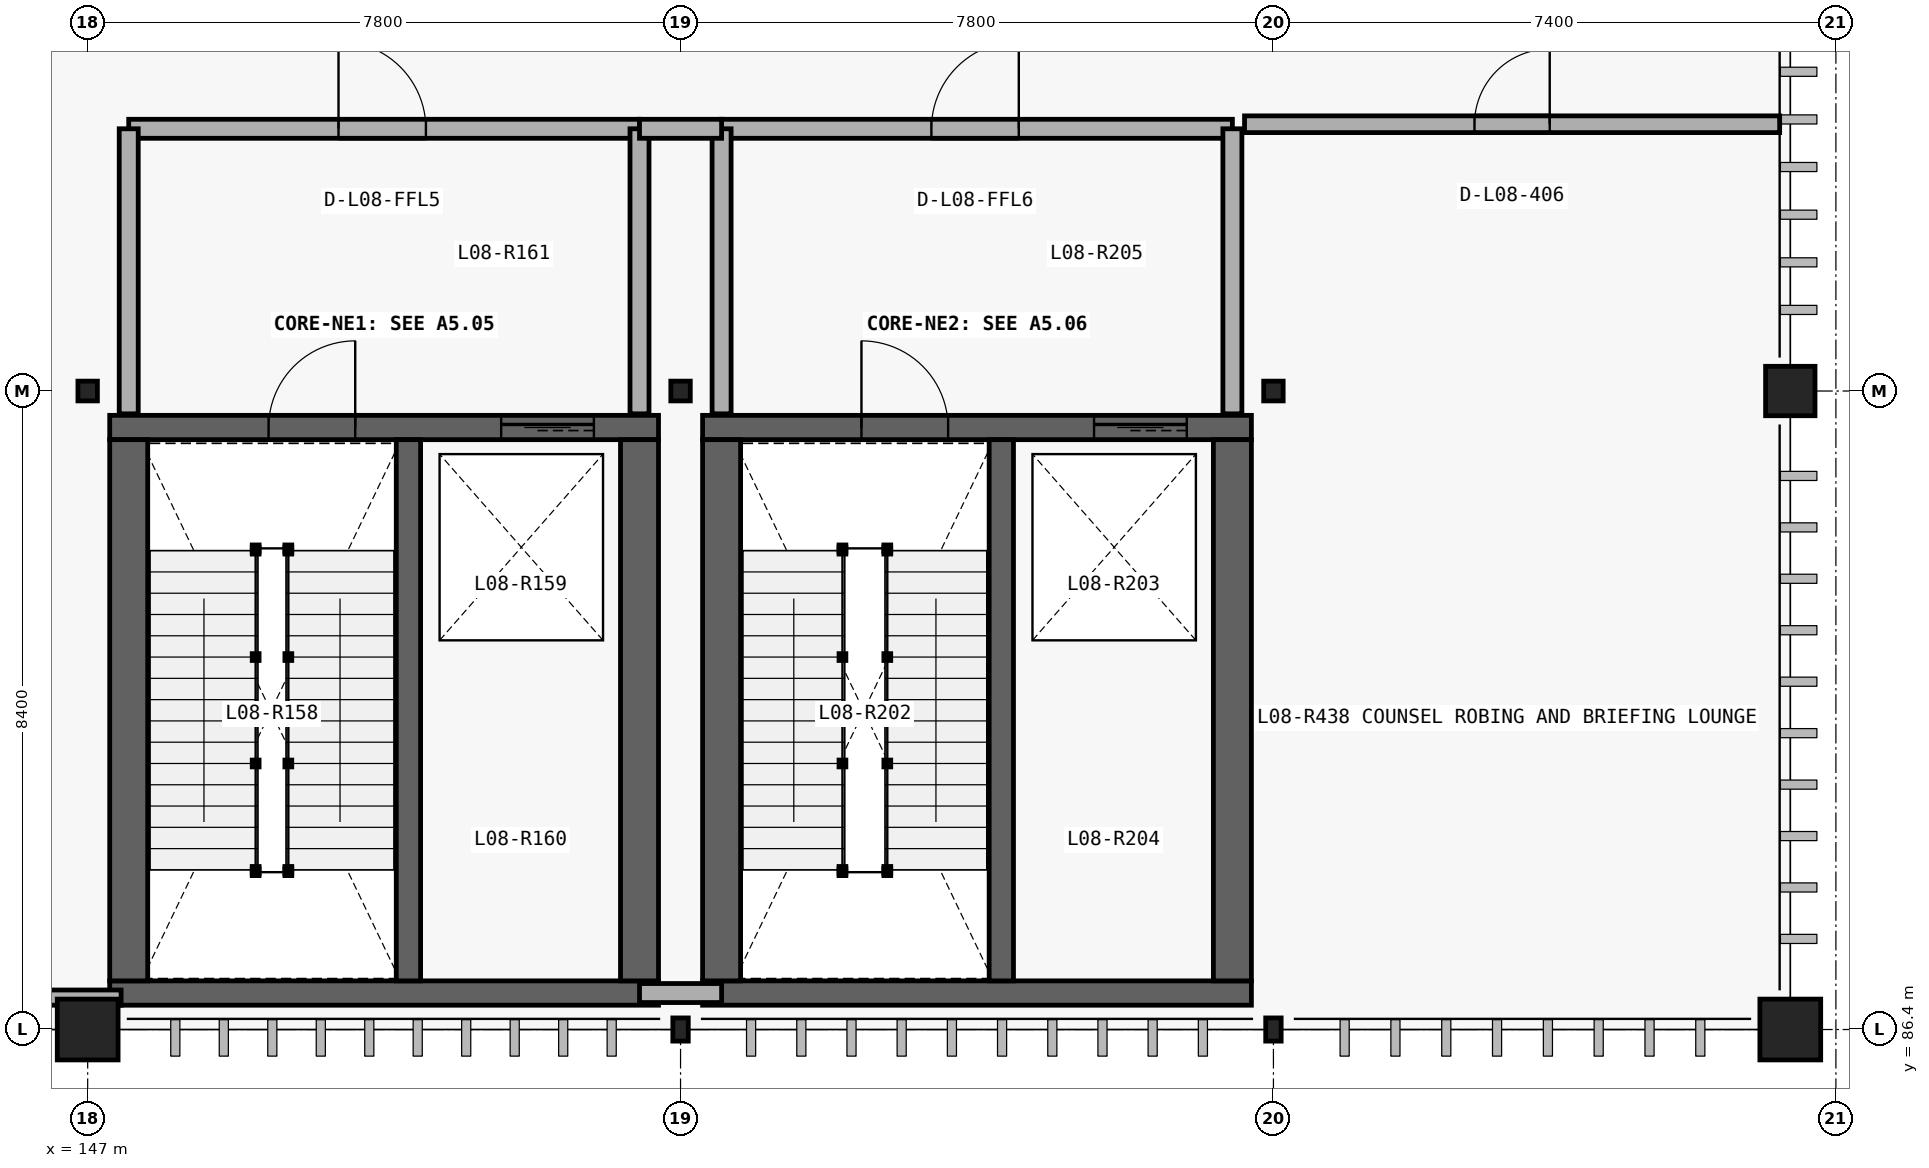
"""IFC4 building model, lengths in metres.
Left out: names, types, materials, properties, quantities, classifications, styles, units other than length and angle.
Written with IfcOpenShell. Run it as: python <this file> out.ifc"""

import sys

from ifc_helpers import new_model, si_unit, direction, frame, frame_2d, origin_with_axes, origin_2d_with_axis, place, context, subcontext, project, spatial, rectangle, hollow_rectangle, circle, i_section, extrude, element, fill, save


model = new_model("IFC4")
c1 = context("Model", 3, precision=1e-05, world=origin_with_axes(), true_north=direction((0.0, 1.0)))
c2 = subcontext(c1, "Body", "Model", "MODEL_VIEW")
j1 = project(units=[si_unit("LENGTHUNIT", "METRE"), si_unit("PLANEANGLEUNIT", "RADIAN")], contexts=[c1])
p1 = place(None, origin_with_axes())
s1 = spatial("IfcSite", under=j1, at=p1, CompositionType="ELEMENT")
p2 = place(p1, origin_with_axes())
s2 = spatial("IfcBuilding", under=s1, at=p2, CompositionType="ELEMENT")
p3 = place(p2, frame((0.0, 0.0, 39.0), z_axis=(0.0, 0.0, 1.0), x_axis=(1.0, 0.0, 0.0)))
s3 = spatial("IfcBuildingStorey", under=s2, at=p3, CompositionType="ELEMENT", Elevation=39.0)
p4 = place(None, frame((147.29, 86.88, 39.0), z_axis=(0.0, 0.0, 1.0), x_axis=(1.0, 0.0, 0.0)))
e1 = element("IfcWall", 1, at=p4, inside=s3, PredefinedType="SHEAR", context=c2, shape_type="SweptSolid", body=[
    extrude(rectangle(XDim=7.22, YDim=0.32, at=frame_2d((3.61, 0.0), x_axis=(1.0, 0.0))), origin_with_axes(), (0.0, 0.0, 1.0), 4.5),
])
p5 = place(None, frame((154.51, 94.32, 39.0), z_axis=(0.0, 0.0, 1.0), x_axis=(-1.0, 0.0, 0.0)))
e2 = element("IfcWall", 2, at=p5, inside=s3, PredefinedType="SHEAR", context=c2, shape_type="SweptSolid", body=[
    extrude(rectangle(XDim=7.22, YDim=0.32, at=frame_2d((3.61, 0.0), x_axis=(1.0, 0.0))), origin_with_axes(), (0.0, 0.0, 1.0), 4.5),
])
p6 = place(None, frame((149.95, 94.32, 39.0), z_axis=(0.0, 0.0, 1.0), x_axis=(-1.0, 0.0, 0.0)))
e3 = element("IfcOpeningElement", 3, at=p6, cuts=e2, PredefinedType="OPENING", context=c2, shape_type="SweptSolid", body=[
    extrude(rectangle(XDim=1.14, YDim=2.18, at=frame_2d((0.0, 1.09), x_axis=(1.0, 0.0))), frame((0.0, 0.17, 0.0), z_axis=(0.0, -1.0, 0.0), x_axis=(1.0, 0.0, 0.0)), (0.0, 0.0, 1.0), 0.34),
])
p7 = place(None, frame((153.05, 94.32, 39.0), z_axis=(0.0, 0.0, 1.0), x_axis=(-1.0, 0.0, 0.0)))
e4 = element("IfcOpeningElement", 4, at=p7, cuts=e2, PredefinedType="OPENING", context=c2, shape_type="SweptSolid", body=[
    extrude(rectangle(XDim=1.22, YDim=2.28, at=frame_2d((0.0, 1.14), x_axis=(1.0, 0.0))), frame((0.0, 0.17, 0.0), z_axis=(0.0, -1.0, 0.0), x_axis=(1.0, 0.0, 0.0)), (0.0, 0.0, 1.0), 0.34),
])
for number, where, z_axis, x_axis in (
    (5, (154.26, 87.04, 39.0), (0.0, 0.0, 1.0), (0.0, 1.0, 0.0)),
    (6, (147.54, 94.16, 39.0), (0.0, 0.0, 1.0), (0.0, -1.0, 0.0)),
):
    element("IfcWall", number, at=place(None, frame(where, z_axis=z_axis, x_axis=x_axis)), inside=s3, PredefinedType="SHEAR", context=c2, shape_type="SweptSolid", body=[
        extrude(rectangle(XDim=7.12, YDim=0.5, at=frame_2d((3.56, 0.0), x_axis=(1.0, 0.0))), origin_with_axes(), (0.0, 0.0, 1.0), 4.5),
    ])
p8 = place(None, frame((151.22, 87.04, 39.0), z_axis=(0.0, 0.0, 1.0), x_axis=(0.0, 1.0, 0.0)))
e7 = element("IfcWall", 7, at=p8, inside=s3, PredefinedType="SHEAR", context=c2, shape_type="SweptSolid", body=[
    extrude(rectangle(XDim=7.12, YDim=0.32, at=frame_2d((3.56, 0.0), x_axis=(1.0, 0.0))), origin_with_axes(), (0.0, 0.0, 1.0), 4.5),
])
p9 = place(None, frame((154.26, 98.25, 39.0), z_axis=(0.0, 0.0, 1.0), x_axis=(-1.0, 0.0, 0.0)))
e8 = element("IfcWall", 8, at=p9, inside=s3, PredefinedType="PARTITIONING", context=c2, shape_type="SweptSolid", body=[
    extrude(rectangle(XDim=6.72, YDim=0.25, at=frame_2d((3.36, 0.0), x_axis=(1.0, 0.0))), origin_with_axes(), (0.0, 0.0, 1.0), 4.18),
])
p10 = place(None, frame((150.875, 98.25, 39.0), z_axis=(0.0, 0.0, 1.0), x_axis=(-1.0, 0.0, 0.0)))
e9 = element("IfcOpeningElement", 9, at=p10, cuts=e8, PredefinedType="OPENING", context=c2, shape_type="SweptSolid", body=[
    extrude(rectangle(XDim=1.15, YDim=2.25, at=frame_2d((0.0, 1.125), x_axis=(1.0, 0.0))), frame((0.0, 0.135, 0.0), z_axis=(0.0, -1.0, 0.0), x_axis=(1.0, 0.0, 0.0)), (0.0, 0.0, 1.0), 0.27),
])
for number, where, z_axis, x_axis in (
    (10, (147.54, 94.5, 39.0), (0.0, 0.0, 1.0), (0.0, 1.0, 0.0)),
    (11, (154.26, 94.5, 39.0), (0.0, 0.0, 1.0), (0.0, 1.0, 0.0)),
):
    element("IfcWall", number, at=place(None, frame(where, z_axis=z_axis, x_axis=x_axis)), inside=s3, PredefinedType="PARTITIONING", context=c2, shape_type="SweptSolid", body=[
        extrude(rectangle(XDim=3.75, YDim=0.25, at=frame_2d((1.875, 0.0), x_axis=(1.0, 0.0))), origin_with_axes(), (0.0, 0.0, 1.0), 4.18),
    ])
p11 = place(None, frame((155.09, 86.88, 39.0), z_axis=(0.0, 0.0, 1.0), x_axis=(1.0, 0.0, 0.0)))
e12 = element("IfcWall", 12, at=p11, inside=s3, PredefinedType="SHEAR", context=c2, shape_type="SweptSolid", body=[
    extrude(rectangle(XDim=7.22, YDim=0.32, at=frame_2d((3.61, 0.0), x_axis=(1.0, 0.0))), origin_with_axes(), (0.0, 0.0, 1.0), 4.5),
])
p12 = place(None, frame((162.31, 94.32, 39.0), z_axis=(0.0, 0.0, 1.0), x_axis=(-1.0, 0.0, 0.0)))
e13 = element("IfcWall", 13, at=p12, inside=s3, PredefinedType="SHEAR", context=c2, shape_type="SweptSolid", body=[
    extrude(rectangle(XDim=7.22, YDim=0.32, at=frame_2d((3.61, 0.0), x_axis=(1.0, 0.0))), origin_with_axes(), (0.0, 0.0, 1.0), 4.5),
])
p13 = place(None, frame((157.75, 94.32, 39.0), z_axis=(0.0, 0.0, 1.0), x_axis=(-1.0, 0.0, 0.0)))
e14 = element("IfcOpeningElement", 14, at=p13, cuts=e13, PredefinedType="OPENING", context=c2, shape_type="SweptSolid", body=[
    extrude(rectangle(XDim=1.14, YDim=2.18, at=frame_2d((0.0, 1.09), x_axis=(1.0, 0.0))), frame((0.0, 0.17, 0.0), z_axis=(0.0, -1.0, 0.0), x_axis=(1.0, 0.0, 0.0)), (0.0, 0.0, 1.0), 0.34),
])
p14 = place(None, frame((160.85, 94.32, 39.0), z_axis=(0.0, 0.0, 1.0), x_axis=(-1.0, 0.0, 0.0)))
e15 = element("IfcOpeningElement", 15, at=p14, cuts=e13, PredefinedType="OPENING", context=c2, shape_type="SweptSolid", body=[
    extrude(rectangle(XDim=1.22, YDim=2.28, at=frame_2d((0.0, 1.14), x_axis=(1.0, 0.0))), frame((0.0, 0.17, 0.0), z_axis=(0.0, -1.0, 0.0), x_axis=(1.0, 0.0, 0.0)), (0.0, 0.0, 1.0), 0.34),
])
for number, where, z_axis, x_axis in (
    (16, (162.06, 87.04, 39.0), (0.0, 0.0, 1.0), (0.0, 1.0, 0.0)),
    (17, (155.34, 94.16, 39.0), (0.0, 0.0, 1.0), (0.0, -1.0, 0.0)),
):
    element("IfcWall", number, at=place(None, frame(where, z_axis=z_axis, x_axis=x_axis)), inside=s3, PredefinedType="SHEAR", context=c2, shape_type="SweptSolid", body=[
        extrude(rectangle(XDim=7.12, YDim=0.5, at=frame_2d((3.56, 0.0), x_axis=(1.0, 0.0))), origin_with_axes(), (0.0, 0.0, 1.0), 4.5),
    ])
p15 = place(None, frame((159.02, 87.04, 39.0), z_axis=(0.0, 0.0, 1.0), x_axis=(0.0, 1.0, 0.0)))
e18 = element("IfcWall", 18, at=p15, inside=s3, PredefinedType="SHEAR", context=c2, shape_type="SweptSolid", body=[
    extrude(rectangle(XDim=7.12, YDim=0.32, at=frame_2d((3.56, 0.0), x_axis=(1.0, 0.0))), origin_with_axes(), (0.0, 0.0, 1.0), 4.5),
])
p16 = place(None, frame((162.06, 98.25, 39.0), z_axis=(0.0, 0.0, 1.0), x_axis=(-1.0, 0.0, 0.0)))
e19 = element("IfcWall", 19, at=p16, inside=s3, PredefinedType="PARTITIONING", context=c2, shape_type="SweptSolid", body=[
    extrude(rectangle(XDim=6.72, YDim=0.25, at=frame_2d((3.36, 0.0), x_axis=(1.0, 0.0))), origin_with_axes(), (0.0, 0.0, 1.0), 4.18),
])
p17 = place(None, frame((158.675, 98.25, 39.0), z_axis=(0.0, 0.0, 1.0), x_axis=(-1.0, 0.0, 0.0)))
e20 = element("IfcOpeningElement", 20, at=p17, cuts=e19, PredefinedType="OPENING", context=c2, shape_type="SweptSolid", body=[
    extrude(rectangle(XDim=1.15, YDim=2.25, at=frame_2d((0.0, 1.125), x_axis=(1.0, 0.0))), frame((0.0, 0.135, 0.0), z_axis=(0.0, -1.0, 0.0), x_axis=(1.0, 0.0, 0.0)), (0.0, 0.0, 1.0), 0.27),
])
for number, where, z_axis, x_axis in (
    (21, (155.34, 94.5, 39.0), (0.0, 0.0, 1.0), (0.0, 1.0, 0.0)),
    (22, (162.06, 94.5, 39.0), (0.0, 0.0, 1.0), (0.0, 1.0, 0.0)),
):
    element("IfcWall", number, at=place(None, frame(where, z_axis=z_axis, x_axis=x_axis)), inside=s3, PredefinedType="PARTITIONING", context=c2, shape_type="SweptSolid", body=[
        extrude(rectangle(XDim=3.75, YDim=0.25, at=frame_2d((1.875, 0.0), x_axis=(1.0, 0.0))), origin_with_axes(), (0.0, 0.0, 1.0), 4.18),
    ])
for number, where, z_axis, x_axis in (
    (23, (154.26, 98.25, 39.0), (0.0, 0.0, 1.0), (1.0, 0.0, 0.0)),
    (24, (154.26, 86.88, 39.0), (0.0, 0.0, 1.0), (1.0, 0.0, 0.0)),
):
    element("IfcWall", number, at=place(None, frame(where, z_axis=z_axis, x_axis=x_axis)), inside=s3, PredefinedType="PARTITIONING", context=c2, shape_type="SweptSolid", body=[
        extrude(rectangle(XDim=1.08, YDim=0.25, at=frame_2d((0.54, 0.0), x_axis=(1.0, 0.0))), origin_with_axes(), (0.0, 0.0, 1.0), 4.18),
    ])
p18 = place(None, frame((144.8, 86.82, 39.0), z_axis=(0.0, 0.0, 1.0), x_axis=(1.0, 0.0, 0.0)))
e25 = element("IfcWall", 25, at=p18, inside=s3, PredefinedType="PARTITIONING", context=c2, shape_type="SweptSolid", body=[
    extrude(rectangle(XDim=2.64, YDim=0.2, at=frame_2d((1.32, 0.0), x_axis=(1.0, 0.0))), origin_with_axes(), (0.0, 0.0, 1.0), 4.18),
])
p19 = place(None, frame((162.22, 98.31, 39.0), z_axis=(0.0, 0.0, 1.0), x_axis=(1.0, 0.0, 0.0)))
e26 = element("IfcWall", 26, at=p19, inside=s3, PredefinedType="PARTITIONING", context=c2, shape_type="SweptSolid", body=[
    extrude(rectangle(XDim=7.04, YDim=0.22, at=frame_2d((3.52, 0.0), x_axis=(1.0, 0.0))), origin_with_axes(), (0.0, 0.0, 1.0), 4.18),
])
p20 = place(None, frame((165.74, 98.31, 39.0), z_axis=(0.0, 0.0, 1.0), x_axis=(1.0, 0.0, 0.0)))
e27 = element("IfcOpeningElement", 27, at=p20, cuts=e26, PredefinedType="OPENING", context=c2, shape_type="SweptSolid", body=[
    extrude(rectangle(XDim=0.99, YDim=2.22, at=frame_2d((0.0, 1.11), x_axis=(1.0, 0.0))), frame((0.0, 0.12, 0.0), z_axis=(0.0, -1.0, 0.0), x_axis=(1.0, 0.0, 0.0)), (0.0, 0.0, 1.0), 0.24),
])
p21 = place(None, frame((147.0, 86.4, 39.0), z_axis=(0.0, 0.0, 1.0), x_axis=(1.0, 0.0, 0.0)))
e28 = element("IfcColumn", 28, at=p21, inside=s3, PredefinedType="COLUMN", context=c2, shape_type="SweptSolid", body=[
    extrude(circle(Radius=0.4, at=origin_2d_with_axis()), origin_with_axes(), (0.0, 0.0, 1.0), 4.5),
])
p22 = place(None, frame((147.0, 94.8, 39.0), z_axis=(0.0, 0.0, 1.0), x_axis=(1.0, 0.0, 0.0)))
e29 = element("IfcColumn", 29, at=p22, inside=s3, PredefinedType="COLUMN", context=c2, shape_type="SweptSolid", body=[
    extrude(i_section(OverallWidth=0.256, OverallDepth=0.26, WebThickness=0.011, FlangeThickness=0.017, at=origin_2d_with_axis()), origin_with_axes(), (0.0, 0.0, 1.0), 4.5),
])
p23 = place(None, frame((154.8, 86.4, 39.0), z_axis=(0.0, 0.0, 1.0), x_axis=(1.0, 0.0, 0.0)))
e30 = element("IfcColumn", 30, at=p23, inside=s3, PredefinedType="COLUMN", context=c2, shape_type="SweptSolid", body=[
    extrude(hollow_rectangle(XDim=0.203, YDim=0.305, WallThickness=0.013, InnerFilletRadius=0.025, OuterFilletRadius=0.013, at=origin_2d_with_axis()), origin_with_axes(), (0.0, 0.0, 1.0), 4.5),
])
p24 = place(None, frame((154.8, 94.8, 39.0), z_axis=(0.0, 0.0, 1.0), x_axis=(1.0, 0.0, 0.0)))
e31 = element("IfcColumn", 31, at=p24, inside=s3, PredefinedType="COLUMN", context=c2, shape_type="SweptSolid", body=[
    extrude(i_section(OverallWidth=0.256, OverallDepth=0.26, WebThickness=0.011, FlangeThickness=0.017, at=origin_2d_with_axis()), origin_with_axes(), (0.0, 0.0, 1.0), 4.5),
])
p25 = place(None, frame((162.6, 86.4, 39.0), z_axis=(0.0, 0.0, 1.0), x_axis=(1.0, 0.0, 0.0)))
e32 = element("IfcColumn", 32, at=p25, inside=s3, PredefinedType="COLUMN", context=c2, shape_type="SweptSolid", body=[
    extrude(hollow_rectangle(XDim=0.203, YDim=0.305, WallThickness=0.013, InnerFilletRadius=0.025, OuterFilletRadius=0.013, at=origin_2d_with_axis()), origin_with_axes(), (0.0, 0.0, 1.0), 4.5),
])
p26 = place(None, frame((162.6, 94.8, 39.0), z_axis=(0.0, 0.0, 1.0), x_axis=(1.0, 0.0, 0.0)))
e33 = element("IfcColumn", 33, at=p26, inside=s3, PredefinedType="COLUMN", context=c2, shape_type="SweptSolid", body=[
    extrude(i_section(OverallWidth=0.256, OverallDepth=0.26, WebThickness=0.011, FlangeThickness=0.017, at=origin_2d_with_axis()), origin_with_axes(), (0.0, 0.0, 1.0), 4.5),
])
p27 = place(None, frame((169.4, 86.4, 39.0), z_axis=(0.0, 0.0, 1.0), x_axis=(1.0, 0.0, 0.0)))
e34 = element("IfcColumn", 34, at=p27, inside=s3, PredefinedType="COLUMN", context=c2, shape_type="SweptSolid", body=[
    extrude(circle(Radius=0.4, at=origin_2d_with_axis()), origin_with_axes(), (0.0, 0.0, 1.0), 4.5),
])
p28 = place(None, frame((169.4, 94.8, 39.0), z_axis=(0.0, 0.0, 1.0), x_axis=(1.0, 0.0, 0.0)))
e35 = element("IfcColumn", 35, at=p28, inside=s3, PredefinedType="COLUMN", context=c2, shape_type="SweptSolid", body=[
    extrude(circle(Radius=0.325, at=origin_2d_with_axis()), origin_with_axes(), (0.0, 0.0, 1.0), 4.5),
])
p29 = place(None, frame((149.95, 94.32, 39.0), z_axis=(0.0, 0.0, 1.0), x_axis=(1.0, 0.0, 0.0)))
e36 = element("IfcDoor", 36, at=p29, inside=s3, OperationType="SINGLE_SWING_LEFT", PredefinedType="DOOR", context=c2, shape_type="SweptSolid", body=[
    extrude(rectangle(XDim=1.14, YDim=2.18, at=frame_2d((0.0, 1.09), x_axis=(1.0, 0.0))), frame((0.0, 0.04, 0.0), z_axis=(0.0, -1.0, 0.0), x_axis=(1.0, 0.0, 0.0)), (0.0, 0.0, 1.0), 0.08),
])
fill(e3, e36)
p30 = place(None, frame((153.05, 94.32, 39.0), z_axis=(0.0, 0.0, 1.0), x_axis=(1.0, 0.0, 0.0)))
e37 = element("IfcDoor", 37, at=p30, inside=s3, OperationType="SLIDING_TO_LEFT", PredefinedType="DOOR", context=c2, shape_type="SweptSolid", body=[
    extrude(rectangle(XDim=1.22, YDim=2.28, at=frame_2d((0.0, 1.14), x_axis=(1.0, 0.0))), frame((0.0, 0.04, 0.0), z_axis=(0.0, -1.0, 0.0), x_axis=(1.0, 0.0, 0.0)), (0.0, 0.0, 1.0), 0.08),
])
fill(e4, e37)
p31 = place(None, frame((150.875, 98.25, 39.0), z_axis=(0.0, 0.0, 1.0), x_axis=(1.0, 0.0, 0.0)))
e38 = element("IfcDoor", 38, at=p31, inside=s3, OperationType="SINGLE_SWING_RIGHT", PredefinedType="DOOR", context=c2, shape_type="SweptSolid", body=[
    extrude(rectangle(XDim=1.15, YDim=2.25, at=frame_2d((0.0, 1.125), x_axis=(1.0, 0.0))), frame((0.0, 0.04, 0.0), z_axis=(0.0, -1.0, 0.0), x_axis=(1.0, 0.0, 0.0)), (0.0, 0.0, 1.0), 0.08),
])
fill(e9, e38)
p32 = place(None, frame((157.75, 94.32, 39.0), z_axis=(0.0, 0.0, 1.0), x_axis=(1.0, 0.0, 0.0)))
e39 = element("IfcDoor", 39, at=p32, inside=s3, OperationType="SINGLE_SWING_RIGHT", PredefinedType="DOOR", context=c2, shape_type="SweptSolid", body=[
    extrude(rectangle(XDim=1.14, YDim=2.18, at=frame_2d((0.0, 1.09), x_axis=(1.0, 0.0))), frame((0.0, 0.04, 0.0), z_axis=(0.0, -1.0, 0.0), x_axis=(1.0, 0.0, 0.0)), (0.0, 0.0, 1.0), 0.08),
])
fill(e14, e39)
p33 = place(None, frame((160.85, 94.32, 39.0), z_axis=(0.0, 0.0, 1.0), x_axis=(1.0, 0.0, 0.0)))
e40 = element("IfcDoor", 40, at=p33, inside=s3, OperationType="SLIDING_TO_LEFT", PredefinedType="DOOR", context=c2, shape_type="SweptSolid", body=[
    extrude(rectangle(XDim=1.22, YDim=2.28, at=frame_2d((0.0, 1.14), x_axis=(1.0, 0.0))), frame((0.0, 0.04, 0.0), z_axis=(0.0, -1.0, 0.0), x_axis=(1.0, 0.0, 0.0)), (0.0, 0.0, 1.0), 0.08),
])
fill(e15, e40)
p34 = place(None, frame((158.675, 98.25, 39.0), z_axis=(0.0, 0.0, 1.0), x_axis=(1.0, 0.0, 0.0)))
e41 = element("IfcDoor", 41, at=p34, inside=s3, OperationType="SINGLE_SWING_LEFT", PredefinedType="DOOR", context=c2, shape_type="SweptSolid", body=[
    extrude(rectangle(XDim=1.15, YDim=2.25, at=frame_2d((0.0, 1.125), x_axis=(1.0, 0.0))), frame((0.0, 0.04, 0.0), z_axis=(0.0, -1.0, 0.0), x_axis=(1.0, 0.0, 0.0)), (0.0, 0.0, 1.0), 0.08),
])
fill(e20, e41)
p35 = place(None, frame((165.74, 98.31, 39.0), z_axis=(0.0, 0.0, 1.0), x_axis=(1.0, 0.0, 0.0)))
e42 = element("IfcDoor", 42, at=p35, inside=s3, OperationType="SINGLE_SWING_RIGHT", PredefinedType="DOOR", context=c2, shape_type="SweptSolid", body=[
    extrude(rectangle(XDim=0.99, YDim=2.22, at=frame_2d((0.0, 1.11), x_axis=(1.0, 0.0))), frame((0.0, 0.04, 0.0), z_axis=(0.0, -1.0, 0.0), x_axis=(1.0, 0.0, 0.0)), (0.0, 0.0, 1.0), 0.08),
])
fill(e27, e42)
save(model, sys.argv[1])
